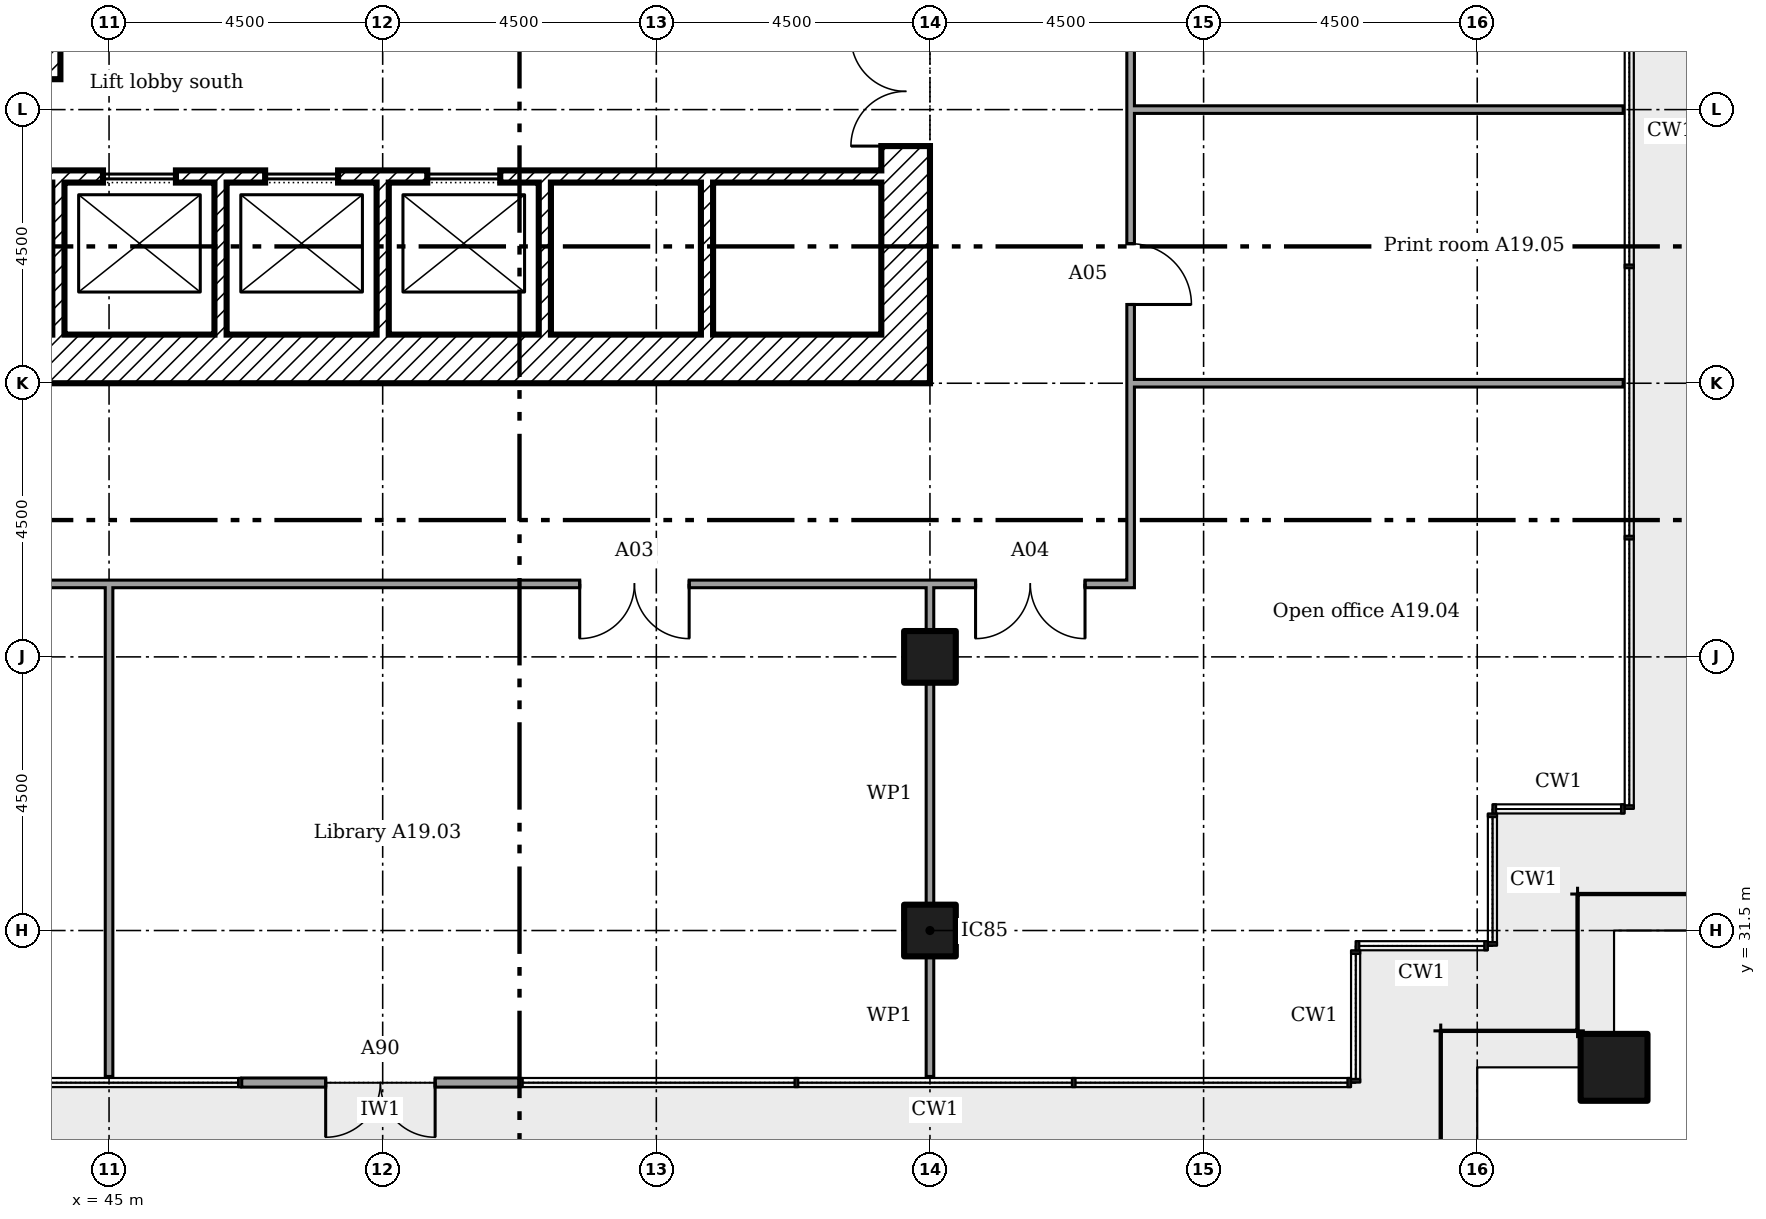
"""IFC4 building model, lengths in metres.
Left out: names, types, materials, properties, quantities, classifications, styles, units other than length and angle.
Written with IfcOpenShell. Run it as: python <this file> out.ifc"""

import sys

from ifc_helpers import new_model, si_unit, direction, frame, frame_2d, origin, origin_2d, place, context, subcontext, project, spatial, rectangle, extrude, element, fill, save


model = new_model("IFC4")
c1 = context("Model", 3, precision=1e-05, world=origin(), true_north=direction((0.0, 1.0)))
c2 = subcontext(c1, "Body", "Model", "MODEL_VIEW")
j1 = project(units=[si_unit("LENGTHUNIT", "METRE"), si_unit("PLANEANGLEUNIT", "RADIAN")], contexts=[c1])
p1 = place(None, origin())
s1 = spatial("IfcSite", under=j1, at=p1, CompositionType="ELEMENT")
p2 = place(p1, origin())
s2 = spatial("IfcBuilding", under=s1, at=p2, CompositionType="ELEMENT")
p3 = place(p2, frame((0.0, 0.0, 79.8)))
s3 = spatial("IfcBuildingStorey", under=s2, at=p3, CompositionType="ELEMENT", Elevation=79.8)
p4 = place(p3, frame((69.75, 29.25, 0.0)))
e1 = element("IfcColumn", 1, at=p4, inside=s3, PredefinedType="COLUMN", context=c2, shape_type="SweptSolid", body=[
    extrude(rectangle(XDim=1.1, YDim=1.1, at=origin_2d()), origin(), (0.0, 0.0, 1.0), 3.6),
])
for number, where in (
    (2, (58.5, 31.5, 0.0)),
    (3, (58.5, 36.0, 0.0)),
):
    element("IfcColumn", number, at=place(p3, frame(where)), inside=s3, PredefinedType="COLUMN", context=c2, shape_type="SweptSolid", body=[
        extrude(rectangle(XDim=0.85, YDim=0.85, at=origin_2d()), origin(), (0.0, 0.0, 1.0), 3.6),
    ])
p5 = place(p3, frame((47.182, 29.0, 0.0)))
e4 = element("IfcWall", 4, at=p5, inside=s3, PredefinedType="SOLIDWALL", context=c2, shape_type="SweptSolid", body=[
    extrude(rectangle(XDim=4.561, YDim=0.15, at=frame_2d((2.28, 0.0))), origin(), (0.0, 0.0, 1.0), 3.45),
])
p6 = place(p5, frame((1.38, 0.0, 0.0)))
e5 = element("IfcOpeningElement", 5, at=p6, cuts=e4, PredefinedType="OPENING", context=c2, shape_type="SweptSolid", body=[
    extrude(rectangle(XDim=1.8, YDim=2.4, at=frame_2d((0.9, 1.2))), frame((0.0, 0.085, 0.0), z_axis=(0.0, -1.0, 0.0), x_axis=(1.0, 0.0, 0.0)), (0.0, 0.0, 1.0), 0.17),
])
p7 = place(p3, frame((58.1, 40.5, 0.0), z_axis=(0.0, 0.0, 1.0), x_axis=(0.0, 1.0, 0.0)))
e6 = element("IfcWall", 6, at=p7, inside=s3, PredefinedType="SHEAR", context=c2, shape_type="SweptSolid", body=[
    extrude(rectangle(XDim=18.0, YDim=0.8, at=frame_2d((9.0, 0.0))), origin(), (0.0, 0.0, 1.0), 3.35),
])
p8 = place(p7, frame((13.15, 0.0, 0.0)))
e7 = element("IfcOpeningElement", 7, at=p8, cuts=e6, PredefinedType="OPENING", context=c2, shape_type="SweptSolid", body=[
    extrude(rectangle(XDim=1.2, YDim=2.1, at=frame_2d((0.6, 1.05))), frame((0.0, 0.41, 0.0), z_axis=(0.0, -1.0, 0.0), x_axis=(1.0, 0.0, 0.0)), (0.0, 0.0, 1.0), 0.82),
])
p9 = place(p7, frame((3.9, 0.0, 0.0)))
e8 = element("IfcOpeningElement", 8, at=p9, cuts=e6, PredefinedType="OPENING", context=c2, shape_type="SweptSolid", body=[
    extrude(rectangle(XDim=1.8, YDim=2.1, at=frame_2d((0.9, 1.05))), frame((0.0, 0.41, 0.0), z_axis=(0.0, -1.0, 0.0), x_axis=(1.0, 0.0, 0.0)), (0.0, 0.0, 1.0), 0.82),
])
p10 = place(p7, frame((11.525, 0.0, 0.0)))
e9 = element("IfcOpeningElement", 9, at=p10, cuts=e6, PredefinedType="OPENING", context=c2, shape_type="SweptSolid", body=[
    extrude(rectangle(XDim=1.0, YDim=2.1, at=frame_2d((0.5, 1.05))), frame((0.0, 0.41, 0.0), z_axis=(0.0, -1.0, 0.0), x_axis=(1.0, 0.0, 0.0)), (0.0, 0.0, 1.0), 0.82),
])
p11 = place(p3, frame((41.3, 40.9, 0.0)))
e10 = element("IfcWall", 10, at=p11, inside=s3, PredefinedType="SHEAR", context=c2, shape_type="SweptSolid", body=[
    extrude(rectangle(XDim=16.4, YDim=0.8, at=frame_2d((8.2, 0.0))), origin(), (0.0, 0.0, 1.0), 3.35),
])
for number, where, z_axis, x_axis in (
    (11, (44.167, 41.3, 0.0), (0.0, 0.0, 1.0), (0.0, 1.0, 0.0)),
    (12, (46.833, 41.3, 0.0), (0.0, 0.0, 1.0), (0.0, 1.0, 0.0)),
    (13, (49.5, 41.3, 0.0), (0.0, 0.0, 1.0), (0.0, 1.0, 0.0)),
    (14, (52.167, 41.3, 0.0), (0.0, 0.0, 1.0), (0.0, 1.0, 0.0)),
    (15, (54.833, 41.3, 0.0), (0.0, 0.0, 1.0), (0.0, 1.0, 0.0)),
):
    element("IfcWall", number, at=place(p3, frame(where, z_axis=z_axis, x_axis=x_axis)), inside=s3, PredefinedType="SHEAR", context=c2, shape_type="SweptSolid", body=[
        extrude(rectangle(XDim=2.5, YDim=0.2, at=frame_2d((1.25, 0.0))), origin(), (0.0, 0.0, 1.0), 3.35),
    ])
p12 = place(p3, frame((41.3, 43.9, 0.0)))
e16 = element("IfcWall", 16, at=p12, inside=s3, PredefinedType="SHEAR", context=c2, shape_type="SweptSolid", body=[
    extrude(rectangle(XDim=16.4, YDim=0.2, at=frame_2d((8.2, 0.0))), origin(), (0.0, 0.0, 1.0), 3.35),
])
p13 = place(p12, frame((0.933, 0.0, 0.0)))
e17 = element("IfcOpeningElement", 17, at=p13, cuts=e16, PredefinedType="OPENING", context=c2, shape_type="SweptSolid", body=[
    extrude(rectangle(XDim=1.2, YDim=2.1, at=frame_2d((0.6, 1.05))), frame((0.0, 0.11, 0.0), z_axis=(0.0, -1.0, 0.0), x_axis=(1.0, 0.0, 0.0)), (0.0, 0.0, 1.0), 0.22),
])
p14 = place(p12, frame((3.6, 0.0, 0.0)))
e18 = element("IfcOpeningElement", 18, at=p14, cuts=e16, PredefinedType="OPENING", context=c2, shape_type="SweptSolid", body=[
    extrude(rectangle(XDim=1.2, YDim=2.1, at=frame_2d((0.6, 1.05))), frame((0.0, 0.11, 0.0), z_axis=(0.0, -1.0, 0.0), x_axis=(1.0, 0.0, 0.0)), (0.0, 0.0, 1.0), 0.22),
])
p15 = place(p12, frame((6.267, 0.0, 0.0)))
e19 = element("IfcOpeningElement", 19, at=p15, cuts=e16, PredefinedType="OPENING", context=c2, shape_type="SweptSolid", body=[
    extrude(rectangle(XDim=1.2, YDim=2.1, at=frame_2d((0.6, 1.05))), frame((0.0, 0.11, 0.0), z_axis=(0.0, -1.0, 0.0), x_axis=(1.0, 0.0, 0.0)), (0.0, 0.0, 1.0), 0.22),
])
p16 = place(p12, frame((8.933, 0.0, 0.0)))
e20 = element("IfcOpeningElement", 20, at=p16, cuts=e16, PredefinedType="OPENING", context=c2, shape_type="SweptSolid", body=[
    extrude(rectangle(XDim=1.2, YDim=2.1, at=frame_2d((0.6, 1.05))), frame((0.0, 0.11, 0.0), z_axis=(0.0, -1.0, 0.0), x_axis=(1.0, 0.0, 0.0)), (0.0, 0.0, 1.0), 0.22),
])
p17 = place(p3, frame((44.1, 45.5, 0.0), z_axis=(0.0, 0.0, 1.0), x_axis=(0.0, 1.0, 0.0)))
e21 = element("IfcWall", 21, at=p17, inside=s3, PredefinedType="SHEAR", context=c2, shape_type="SweptSolid", body=[
    extrude(rectangle(XDim=6.9, YDim=0.2, at=frame_2d((3.45, 0.0))), origin(), (0.0, 0.0, 1.0), 3.35),
])
p18 = place(p3, frame((38.637, 37.2, 0.0)))
e22 = element("IfcWall", 22, at=p18, inside=s3, PredefinedType="PARTITIONING", context=c2, shape_type="SweptSolid", body=[
    extrude(rectangle(XDim=23.225, YDim=0.125, at=frame_2d((11.613, 0.0))), origin(), (0.0, 0.0, 1.0), 3.45),
])
p19 = place(p18, frame((1.683, 0.0, 0.0)))
e23 = element("IfcOpeningElement", 23, at=p19, cuts=e22, PredefinedType="OPENING", context=c2, shape_type="SweptSolid", body=[
    extrude(rectangle(XDim=1.8, YDim=2.1, at=frame_2d((0.9, 1.05))), frame((0.0, 0.073, 0.0), z_axis=(0.0, -1.0, 0.0), x_axis=(1.0, 0.0, 0.0)), (0.0, 0.0, 1.0), 0.145),
])
p20 = place(p18, frame((14.103, 0.0, 0.0)))
e24 = element("IfcOpeningElement", 24, at=p20, cuts=e22, PredefinedType="OPENING", context=c2, shape_type="SweptSolid", body=[
    extrude(rectangle(XDim=1.8, YDim=2.1, at=frame_2d((0.9, 1.05))), frame((0.0, 0.073, 0.0), z_axis=(0.0, -1.0, 0.0), x_axis=(1.0, 0.0, 0.0)), (0.0, 0.0, 1.0), 0.145),
])
p21 = place(p18, frame((20.613, 0.0, 0.0)))
e25 = element("IfcOpeningElement", 25, at=p21, cuts=e22, PredefinedType="OPENING", context=c2, shape_type="SweptSolid", body=[
    extrude(rectangle(XDim=1.8, YDim=2.1, at=frame_2d((0.9, 1.05))), frame((0.0, 0.073, 0.0), z_axis=(0.0, -1.0, 0.0), x_axis=(1.0, 0.0, 0.0)), (0.0, 0.0, 1.0), 0.145),
])
for number, where in (
    (26, (61.8, 40.5, 0.0)),
    (27, (61.8, 45.0, 0.0)),
):
    element("IfcWall", number, at=place(p3, frame(where)), inside=s3, PredefinedType="PARTITIONING", context=c2, shape_type="SweptSolid", body=[
        extrude(rectangle(XDim=8.1, YDim=0.125, at=frame_2d((4.05, 0.0))), origin(), (0.0, 0.0, 1.0), 2.766),
    ])
p22 = place(p3, frame((45.0, 29.1, 0.0), z_axis=(0.0, 0.0, 1.0), x_axis=(0.0, 1.0, 0.0)))
e28 = element("IfcWall", 28, at=p22, inside=s3, PredefinedType="PARTITIONING", context=c2, shape_type="SweptSolid", body=[
    extrude(rectangle(XDim=8.1, YDim=0.125, at=frame_2d((4.05, 0.0))), origin(), (0.0, 0.0, 1.0), 2.766),
])
p23 = place(p3, frame((58.5, 29.1, 0.0), z_axis=(0.0, 0.0, 1.0), x_axis=(0.0, 1.0, 0.0)))
e29 = element("IfcWall", 29, at=p23, inside=s3, PredefinedType="PARTITIONING", context=c2, shape_type="SweptSolid", body=[
    extrude(rectangle(XDim=1.975, YDim=0.125, at=frame_2d((0.987, 0.0))), origin(), (0.0, 0.0, 1.0), 2.676),
])
p24 = place(p3, frame((58.5, 31.925, 0.0), z_axis=(0.0, 0.0, 1.0), x_axis=(0.0, 1.0, 0.0)))
e30 = element("IfcWall", 30, at=p24, inside=s3, PredefinedType="PARTITIONING", context=c2, shape_type="SweptSolid", body=[
    extrude(rectangle(XDim=3.65, YDim=0.125, at=frame_2d((1.825, 0.0))), origin(), (0.0, 0.0, 1.0), 2.676),
])
p25 = place(p3, frame((58.5, 36.425, 0.0), z_axis=(0.0, 0.0, 1.0), x_axis=(0.0, 1.0, 0.0)))
e31 = element("IfcWall", 31, at=p25, inside=s3, PredefinedType="PARTITIONING", context=c2, shape_type="SweptSolid", body=[
    extrude(rectangle(XDim=0.775, YDim=0.125, at=frame_2d((0.387, 0.0))), origin(), (0.0, 0.0, 1.0), 2.676),
])
p26 = place(p3, frame((61.8, 37.262, 0.0), z_axis=(0.0, 0.0, 1.0), x_axis=(0.0, 1.0, 0.0)))
e32 = element("IfcWall", 32, at=p26, inside=s3, PredefinedType="PARTITIONING", context=c2, shape_type="SweptSolid", body=[
    extrude(rectangle(XDim=24.475, YDim=0.125, at=frame_2d((12.238, 0.0))), origin(), (0.0, 0.0, 1.0), 3.45),
])
p27 = place(p26, frame((4.532, 0.0, 0.0)))
e33 = element("IfcOpeningElement", 33, at=p27, cuts=e32, PredefinedType="OPENING", context=c2, shape_type="SweptSolid", body=[
    extrude(rectangle(XDim=1.0, YDim=2.1, at=frame_2d((0.5, 1.05))), frame((0.0, 0.073, 0.0), z_axis=(0.0, -1.0, 0.0), x_axis=(1.0, 0.0, 0.0)), (0.0, 0.0, 1.0), 0.145),
])
p28 = place(p26, frame((12.979, 0.0, 0.0)))
e34 = element("IfcOpeningElement", 34, at=p28, cuts=e32, PredefinedType="OPENING", context=c2, shape_type="SweptSolid", body=[
    extrude(rectangle(XDim=1.0, YDim=2.1, at=frame_2d((0.5, 1.05))), frame((0.0, 0.073, 0.0), z_axis=(0.0, -1.0, 0.0), x_axis=(1.0, 0.0, 0.0)), (0.0, 0.0, 1.0), 0.145),
])
p29 = place(p26, frame((18.488, 0.0, 0.0)))
e35 = element("IfcOpeningElement", 35, at=p29, cuts=e32, PredefinedType="OPENING", context=c2, shape_type="SweptSolid", body=[
    extrude(rectangle(XDim=1.0, YDim=2.1, at=frame_2d((0.5, 1.05))), frame((0.0, 0.073, 0.0), z_axis=(0.0, -1.0, 0.0), x_axis=(1.0, 0.0, 0.0)), (0.0, 0.0, 1.0), 0.145),
])
p30 = place(p6, frame((1.8, 0.0, 0.0), x_axis=(-1.0, 0.0, 0.0)))
e36 = element("IfcDoor", 36, at=p30, inside=s3, OperationType="DOUBLE_DOOR_DOUBLE_SWING", PredefinedType="NOTDEFINED", context=c2, shape_type="SweptSolid", body=[
    extrude(rectangle(XDim=1.8, YDim=2.4, at=frame_2d((0.9, 1.2))), frame((0.0, 0.025, 0.0), z_axis=(0.0, -1.0, 0.0), x_axis=(1.0, 0.0, 0.0)), (0.0, 0.0, 1.0), 0.05),
])
fill(e5, e36)
p31 = place(p9, origin())
e37 = element("IfcDoor", 37, at=p31, inside=s3, OperationType="DOUBLE_DOOR_SINGLE_SWING", PredefinedType="DOOR", context=c2, shape_type="SweptSolid", body=[
    extrude(rectangle(XDim=1.8, YDim=2.1, at=frame_2d((0.9, 1.05))), frame((0.0, 0.025, 0.0), z_axis=(0.0, -1.0, 0.0), x_axis=(1.0, 0.0, 0.0)), (0.0, 0.0, 1.0), 0.05),
])
fill(e8, e37)
p32 = place(p14, origin())
e38 = element("IfcDoor", 38, at=p32, inside=s3, OperationType="SLIDING_TO_LEFT", PredefinedType="DOOR", context=c2, shape_type="SweptSolid", body=[
    extrude(rectangle(XDim=1.2, YDim=2.1, at=frame_2d((0.6, 1.05))), frame((0.0, 0.025, 0.0), z_axis=(0.0, -1.0, 0.0), x_axis=(1.0, 0.0, 0.0)), (0.0, 0.0, 1.0), 0.05),
])
fill(e18, e38)
p33 = place(p15, origin())
e39 = element("IfcDoor", 39, at=p33, inside=s3, OperationType="SLIDING_TO_LEFT", PredefinedType="DOOR", context=c2, shape_type="SweptSolid", body=[
    extrude(rectangle(XDim=1.2, YDim=2.1, at=frame_2d((0.6, 1.05))), frame((0.0, 0.025, 0.0), z_axis=(0.0, -1.0, 0.0), x_axis=(1.0, 0.0, 0.0)), (0.0, 0.0, 1.0), 0.05),
])
fill(e19, e39)
p34 = place(p16, origin())
e40 = element("IfcDoor", 40, at=p34, inside=s3, OperationType="SLIDING_TO_LEFT", PredefinedType="DOOR", context=c2, shape_type="SweptSolid", body=[
    extrude(rectangle(XDim=1.2, YDim=2.1, at=frame_2d((0.6, 1.05))), frame((0.0, 0.025, 0.0), z_axis=(0.0, -1.0, 0.0), x_axis=(1.0, 0.0, 0.0)), (0.0, 0.0, 1.0), 0.05),
])
fill(e20, e40)
p35 = place(p20, frame((1.8, 0.0, 0.0), x_axis=(-1.0, 0.0, 0.0)))
e41 = element("IfcDoor", 41, at=p35, inside=s3, OperationType="DOUBLE_DOOR_SINGLE_SWING", PredefinedType="DOOR", context=c2, shape_type="SweptSolid", body=[
    extrude(rectangle(XDim=1.8, YDim=2.1, at=frame_2d((0.9, 1.05))), frame((0.0, 0.025, 0.0), z_axis=(0.0, -1.0, 0.0), x_axis=(1.0, 0.0, 0.0)), (0.0, 0.0, 1.0), 0.05),
])
fill(e24, e41)
p36 = place(p21, frame((1.8, 0.0, 0.0), x_axis=(-1.0, 0.0, 0.0)))
e42 = element("IfcDoor", 42, at=p36, inside=s3, OperationType="DOUBLE_DOOR_SINGLE_SWING", PredefinedType="DOOR", context=c2, shape_type="SweptSolid", body=[
    extrude(rectangle(XDim=1.8, YDim=2.1, at=frame_2d((0.9, 1.05))), frame((0.0, 0.025, 0.0), z_axis=(0.0, -1.0, 0.0), x_axis=(1.0, 0.0, 0.0)), (0.0, 0.0, 1.0), 0.05),
])
fill(e25, e42)
p37 = place(p27, frame((1.0, 0.0, 0.0), x_axis=(-1.0, 0.0, 0.0)))
e43 = element("IfcDoor", 43, at=p37, inside=s3, OperationType="SINGLE_SWING_LEFT", PredefinedType="DOOR", context=c2, shape_type="SweptSolid", body=[
    extrude(rectangle(XDim=1.0, YDim=2.1, at=frame_2d((0.5, 1.05))), frame((0.0, 0.025, 0.0), z_axis=(0.0, -1.0, 0.0), x_axis=(1.0, 0.0, 0.0)), (0.0, 0.0, 1.0), 0.05),
])
fill(e33, e43)
save(model, sys.argv[1])
